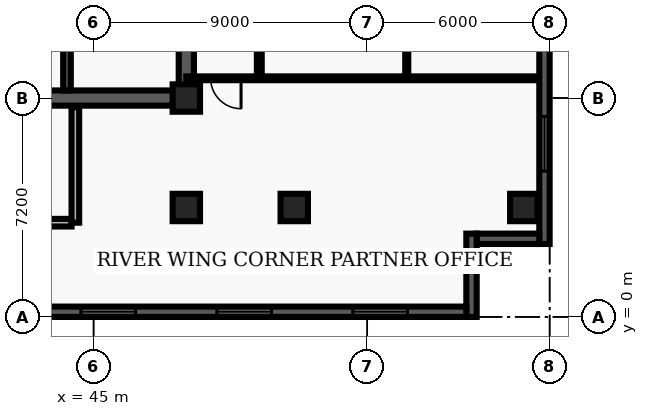
"""IFC4 building model, lengths in metres.
Left out: names, types, materials, properties, quantities, classifications, styles, units other than length and angle.
Written with IfcOpenShell. Run it as: python <this file> out.ifc"""

import sys

from ifc_helpers import new_model, entity, si_unit, converted_unit, direction, frame, origin_with_axes, origin_2d_with_axis, place, context, subcontext, project, spatial, polyline, rectangle, outline, extrude, element, fill, save


model = new_model("IFC4")
c1 = context("Model", 3, precision=1e-05, world=origin_with_axes(), true_north=direction((0.0, 1.0)))
c2 = subcontext(c1, "Body", "Model", "MODEL_VIEW")
j1 = project(units=[si_unit("LENGTHUNIT", "METRE"), converted_unit("PLANEANGLEUNIT", "DEGREE", entity("IfcPlaneAngleMeasure", 0.017), si_unit("PLANEANGLEUNIT", "RADIAN"), dimensions=[0, 0, 0, 0, 0, 0, 0])], contexts=[c1])
p1 = place(None, origin_with_axes())
s1 = spatial("IfcSite", under=j1, at=p1, CompositionType="ELEMENT")
p2 = place(p1, origin_with_axes())
s2 = spatial("IfcBuilding", under=s1, at=p2, CompositionType="ELEMENT")
p3 = place(p2, frame((0.0, 0.0, 200.4), z_axis=(0.0, 0.0, 1.0), x_axis=(1.0, 0.0, 0.0)))
s3 = spatial("IfcBuildingStorey", under=s2, at=p3, CompositionType="ELEMENT", Elevation=200.4)
p4 = place(p3, frame((40.2, 7.2, 0.0), z_axis=(0.0, 0.0, 1.0), x_axis=(1.0, 0.0, 0.0)))
e1 = element("IfcWall", 1, at=p4, inside=s3, PredefinedType="SHEAR", context=c2, shape_type="SweptSolid", body=[
    extrude(outline(polyline([(0.0, -0.25), (7.85, -0.25), (7.85, 0.25), (0.0, 0.25), (0.0, -0.25)])), origin_with_axes(), (0.0, 0.0, 1.0), 3.66),
])
p5 = place(p4, frame((2.175, 0.0, 0.0), z_axis=(0.0, 0.0, 1.0), x_axis=(1.0, 0.0, 0.0)))
e2 = element("IfcOpeningElement", 2, at=p5, cuts=e1, PredefinedType="OPENING", context=c2, shape_type="SweptSolid", body=[
    extrude(rectangle(XDim=1.05, YDim=0.52, at=origin_2d_with_axis()), origin_with_axes(), (0.0, 0.0, 1.0), 2.15),
])
p6 = place(p3, frame((48.05, 7.2, 0.0), z_axis=(0.0, 0.0, 1.0), x_axis=(0.0, 1.0, 0.0)))
e3 = element("IfcWall", 3, at=p6, inside=s3, PredefinedType="SHEAR", context=c2, shape_type="SweptSolid", body=[
    extrude(outline(polyline([(0.0, -0.25), (15.6, -0.25), (15.6, 0.25), (0.0, 0.25), (0.0, -0.25)])), origin_with_axes(), (0.0, 0.0, 1.0), 3.66),
])
p7 = place(p6, frame((5.975, 0.0, 0.0), z_axis=(0.0, 0.0, 1.0), x_axis=(1.0, 0.0, 0.0)))
e4 = element("IfcOpeningElement", 4, at=p7, cuts=e3, PredefinedType="OPENING", context=c2, shape_type="SweptSolid", body=[
    extrude(rectangle(XDim=1.05, YDim=0.52, at=origin_2d_with_axis()), origin_with_axes(), (0.0, 0.0, 1.0), 2.15),
])
p8 = place(p6, frame((2.725, 0.0, 0.0), z_axis=(0.0, 0.0, 1.0), x_axis=(1.0, 0.0, 0.0)))
e5 = element("IfcOpeningElement", 5, at=p8, cuts=e3, PredefinedType="OPENING", context=c2, shape_type="SweptSolid", body=[
    extrude(rectangle(XDim=0.95, YDim=0.52, at=origin_2d_with_axis()), origin_with_axes(), (0.0, 0.0, 1.0), 2.15),
])
p9 = place(p3, frame((44.125, 7.45, 0.0), z_axis=(0.0, 0.0, 1.0), x_axis=(0.0, 1.0, 0.0)))
e6 = element("IfcWall", 6, at=p9, inside=s3, PredefinedType="SHEAR", context=c2, shape_type="SweptSolid", body=[
    extrude(outline(polyline([(0.0, -0.125), (15.1, -0.125), (15.1, 0.125), (0.0, 0.125), (0.0, -0.125)])), origin_with_axes(), (0.0, 0.0, 1.0), 3.66),
])
p10 = place(p3, frame((40.325, 3.1, 0.0), z_axis=(0.0, 0.0, 1.0), x_axis=(1.0, 0.0, 0.0)))
e7 = element("IfcWall", 7, at=p10, inside=s3, PredefinedType="SOLIDWALL", context=c2, shape_type="SweptSolid", body=[
    extrude(outline(polyline([(0.0, -0.125), (3.95, -0.125), (3.95, 0.125), (0.0, 0.125), (0.0, -0.125)])), origin_with_axes(), (0.0, 0.0, 1.0), 2.7),
])
p11 = place(p3, frame((44.4, 3.1, 0.0), z_axis=(0.0, 0.0, 1.0), x_axis=(0.0, 1.0, 0.0)))
e8 = element("IfcWall", 8, at=p11, inside=s3, PredefinedType="SOLIDWALL", context=c2, shape_type="SweptSolid", body=[
    extrude(outline(polyline([(0.0, -0.125), (3.8, -0.125), (3.8, 0.125), (0.0, 0.125), (0.0, -0.125)])), origin_with_axes(), (0.0, 0.0, 1.0), 2.7),
])
for number, where, z_axis, x_axis in (
    (9, (48.05, 3.6, 0.0), (0.0, 0.0, 1.0), (1.0, 0.0, 0.0)),
    (10, (48.05, 7.2, 0.0), (0.0, 0.0, 1.0), (1.0, 0.0, 0.0)),
    (11, (51.6, 3.6, 0.0), (0.0, 0.0, 1.0), (1.0, 0.0, 0.0)),
    (12, (59.15, 3.6, 0.0), (0.0, 0.0, 1.0), (1.0, 0.0, 0.0)),
):
    element("IfcColumn", number, at=place(p3, frame(where, z_axis=z_axis, x_axis=x_axis)), inside=s3, PredefinedType="COLUMN", context=c2, shape_type="SweptSolid", body=[
        extrude(rectangle(XDim=0.9, YDim=0.9, at=origin_2d_with_axis()), origin_with_axes(), (0.0, 0.0, 1.0), 3.9),
    ])
p12 = place(p3, frame((50.45, 7.85, 0.0), z_axis=(0.0, 0.0, 1.0), x_axis=(0.0, 1.0, 0.0)))
e13 = element("IfcWall", 13, at=p12, inside=s3, PredefinedType="PARTITIONING", context=c2, shape_type="SweptSolid", body=[
    extrude(outline(polyline([(0.0, -0.08), (18.8, -0.08), (18.8, 0.08), (0.0, 0.08), (0.0, -0.08)])), origin_with_axes(), (0.0, 0.0, 1.0), 2.7),
])
p13 = place(p12, frame((4.113, 0.0, 0.0), z_axis=(0.0, 0.0, 1.0), x_axis=(1.0, 0.0, 0.0)))
e14 = element("IfcOpeningElement", 14, at=p13, cuts=e13, PredefinedType="OPENING", context=c2, shape_type="SweptSolid", body=[
    extrude(rectangle(XDim=1.0, YDim=0.18, at=origin_2d_with_axis()), origin_with_axes(), (0.0, 0.0, 1.0), 2.15),
])
p14 = place(p12, frame((7.883, 0.0, 0.0), z_axis=(0.0, 0.0, 1.0), x_axis=(1.0, 0.0, 0.0)))
e15 = element("IfcOpeningElement", 15, at=p14, cuts=e13, PredefinedType="OPENING", context=c2, shape_type="SweptSolid", body=[
    extrude(rectangle(XDim=1.0, YDim=0.18, at=origin_2d_with_axis()), origin_with_axes(), (0.0, 0.0, 1.0), 2.15),
])
p15 = place(p12, frame((11.928, 0.0, 0.0), z_axis=(0.0, 0.0, 1.0), x_axis=(1.0, 0.0, 0.0)))
e16 = element("IfcOpeningElement", 16, at=p15, cuts=e13, PredefinedType="OPENING", context=c2, shape_type="SweptSolid", body=[
    extrude(rectangle(XDim=1.0, YDim=0.18, at=origin_2d_with_axis()), origin_with_axes(), (0.0, 0.0, 1.0), 2.15),
])
p16 = place(p12, frame((17.587, 0.0, 0.0), z_axis=(0.0, 0.0, 1.0), x_axis=(1.0, 0.0, 0.0)))
e17 = element("IfcOpeningElement", 17, at=p16, cuts=e13, PredefinedType="OPENING", context=c2, shape_type="SweptSolid", body=[
    extrude(rectangle(XDim=1.0, YDim=0.18, at=origin_2d_with_axis()), origin_with_axes(), (0.0, 0.0, 1.0), 2.15),
])
p17 = place(p3, frame((59.665, 7.85, 0.0), z_axis=(0.0, 0.0, 1.0), x_axis=(-1.0, 0.0, 0.0)))
e18 = element("IfcWall", 18, at=p17, inside=s3, PredefinedType="PARTITIONING", context=c2, shape_type="SweptSolid", body=[
    extrude(outline(polyline([(0.0, -0.062), (11.615, -0.062), (11.615, 0.062), (0.0, 0.062), (0.0, -0.062)])), origin_with_axes(), (0.0, 0.0, 1.0), 2.7),
])
p18 = place(p17, frame((10.315, 0.0, 0.0), z_axis=(0.0, 0.0, 1.0), x_axis=(1.0, 0.0, 0.0)))
e19 = element("IfcOpeningElement", 19, at=p18, cuts=e18, PredefinedType="OPENING", context=c2, shape_type="SweptSolid", body=[
    extrude(rectangle(XDim=1.0, YDim=0.145, at=origin_2d_with_axis()), origin_with_axes(), (0.0, 0.0, 1.0), 2.15),
])
p19 = place(p3, frame((55.3, 7.98, 0.0), z_axis=(0.0, 0.0, 1.0), x_axis=(0.0, 1.0, 0.0)))
e20 = element("IfcWall", 20, at=p19, inside=s3, PredefinedType="PARTITIONING", context=c2, shape_type="SweptSolid", body=[
    extrude(outline(polyline([(0.0, -0.05), (18.54, -0.05), (18.54, 0.05), (0.0, 0.05), (0.0, -0.05)])), origin_with_axes(), (0.0, 0.0, 1.0), 2.7),
])
p20 = place(p19, frame((3.103, 0.0, 0.0), z_axis=(0.0, 0.0, 1.0), x_axis=(1.0, 0.0, 0.0)))
e21 = element("IfcOpeningElement", 21, at=p20, cuts=e20, PredefinedType="OPENING", context=c2, shape_type="SweptSolid", body=[
    extrude(rectangle(XDim=0.95, YDim=0.12, at=origin_2d_with_axis()), origin_with_axes(), (0.0, 0.0, 1.0), 2.15),
])
p21 = place(p19, frame((8.033, 0.0, 0.0), z_axis=(0.0, 0.0, 1.0), x_axis=(1.0, 0.0, 0.0)))
e22 = element("IfcOpeningElement", 22, at=p21, cuts=e20, PredefinedType="OPENING", context=c2, shape_type="SweptSolid", body=[
    extrude(rectangle(XDim=0.95, YDim=0.12, at=origin_2d_with_axis()), origin_with_axes(), (0.0, 0.0, 1.0), 2.15),
])
p22 = place(p19, frame((11.797, 0.0, 0.0), z_axis=(0.0, 0.0, 1.0), x_axis=(1.0, 0.0, 0.0)))
e23 = element("IfcOpeningElement", 23, at=p22, cuts=e20, PredefinedType="OPENING", context=c2, shape_type="SweptSolid", body=[
    extrude(rectangle(XDim=0.95, YDim=0.12, at=origin_2d_with_axis()), origin_with_axes(), (0.0, 0.0, 1.0), 2.15),
])
p23 = place(p19, frame((16.207, 0.0, 0.0), z_axis=(0.0, 0.0, 1.0), x_axis=(1.0, 0.0, 0.0)))
e24 = element("IfcOpeningElement", 24, at=p23, cuts=e20, PredefinedType="OPENING", context=c2, shape_type="SweptSolid", body=[
    extrude(rectangle(XDim=0.95, YDim=0.12, at=origin_2d_with_axis()), origin_with_axes(), (0.0, 0.0, 1.0), 2.15),
])
p24 = place(p3, frame((59.83, 26.06, 0.0), z_axis=(0.0, 0.0, 1.0), x_axis=(0.0, -1.0, 0.0)))
e25 = element("IfcWall", 25, at=p24, inside=s3, PredefinedType="SOLIDWALL", context=c2, shape_type="SweptSolid", body=[
    extrude(outline(polyline([(0.0, -0.17), (23.66, -0.17), (23.66, 0.17), (0.0, 0.17), (0.0, -0.17)])), origin_with_axes(), (0.0, 0.0, 1.0), 3.66),
])
p25 = place(p24, frame((20.364, 0.0, 0.45), z_axis=(0.0, 0.0, 1.0), x_axis=(1.0, 0.0, 0.0)))
e26 = element("IfcOpeningElement", 26, at=p25, cuts=e25, PredefinedType="OPENING", context=c2, shape_type="SweptSolid", body=[
    extrude(rectangle(XDim=1.8, YDim=0.36, at=origin_2d_with_axis()), origin_with_axes(), (0.0, 0.0, 1.0), 2.1),
])
p26 = place(p3, frame((59.66, 2.57, 0.0), z_axis=(0.0, 0.0, 1.0), x_axis=(-1.0, 0.0, 0.0)))
e27 = element("IfcWall", 27, at=p26, inside=s3, PredefinedType="SOLIDWALL", context=c2, shape_type="SweptSolid", body=[
    extrude(outline(polyline([(0.0, -0.17), (2.06, -0.17), (2.06, 0.17), (0.0, 0.17), (0.0, -0.17)])), origin_with_axes(), (0.0, 0.0, 1.0), 3.66),
])
p27 = place(p3, frame((57.43, 2.74, 0.0), z_axis=(0.0, 0.0, 1.0), x_axis=(0.0, -1.0, 0.0)))
e28 = element("IfcWall", 28, at=p27, inside=s3, PredefinedType="SOLIDWALL", context=c2, shape_type="SweptSolid", body=[
    extrude(outline(polyline([(0.0, -0.17), (2.74, -0.17), (2.74, 0.17), (0.0, 0.17), (0.0, -0.17)])), origin_with_axes(), (0.0, 0.0, 1.0), 3.66),
])
p28 = place(p3, frame((57.26, 0.17, 0.0), z_axis=(0.0, 0.0, 1.0), x_axis=(-1.0, 0.0, 0.0)))
e29 = element("IfcWall", 29, at=p28, inside=s3, PredefinedType="SOLIDWALL", context=c2, shape_type="SweptSolid", body=[
    extrude(outline(polyline([(0.0, -0.17), (54.86, -0.17), (54.86, 0.17), (0.0, 0.17), (0.0, -0.17)])), origin_with_axes(), (0.0, 0.0, 1.0), 3.66),
])
p29 = place(p28, frame((2.836, 0.0, 0.45), z_axis=(0.0, 0.0, 1.0), x_axis=(1.0, 0.0, 0.0)))
e30 = element("IfcOpeningElement", 30, at=p29, cuts=e29, PredefinedType="OPENING", context=c2, shape_type="SweptSolid", body=[
    extrude(rectangle(XDim=1.8, YDim=0.36, at=origin_2d_with_axis()), origin_with_axes(), (0.0, 0.0, 1.0), 2.1),
])
p30 = place(p28, frame((7.307, 0.0, 0.45), z_axis=(0.0, 0.0, 1.0), x_axis=(1.0, 0.0, 0.0)))
e31 = element("IfcOpeningElement", 31, at=p30, cuts=e29, PredefinedType="OPENING", context=c2, shape_type="SweptSolid", body=[
    extrude(rectangle(XDim=1.8, YDim=0.36, at=origin_2d_with_axis()), origin_with_axes(), (0.0, 0.0, 1.0), 2.1),
])
p31 = place(p28, frame((11.779, 0.0, 0.45), z_axis=(0.0, 0.0, 1.0), x_axis=(1.0, 0.0, 0.0)))
e32 = element("IfcOpeningElement", 32, at=p31, cuts=e29, PredefinedType="OPENING", context=c2, shape_type="SweptSolid", body=[
    extrude(rectangle(XDim=1.8, YDim=0.36, at=origin_2d_with_axis()), origin_with_axes(), (0.0, 0.0, 1.0), 2.1),
])
p32 = place(p28, frame((16.251, 0.0, 0.45), z_axis=(0.0, 0.0, 1.0), x_axis=(1.0, 0.0, 0.0)))
e33 = element("IfcOpeningElement", 33, at=p32, cuts=e29, PredefinedType="OPENING", context=c2, shape_type="SweptSolid", body=[
    extrude(rectangle(XDim=1.8, YDim=0.36, at=origin_2d_with_axis()), origin_with_axes(), (0.0, 0.0, 1.0), 2.1),
])
p33 = place(p28, frame((20.723, 0.0, 0.45), z_axis=(0.0, 0.0, 1.0), x_axis=(1.0, 0.0, 0.0)))
e34 = element("IfcOpeningElement", 34, at=p33, cuts=e29, PredefinedType="OPENING", context=c2, shape_type="SweptSolid", body=[
    extrude(rectangle(XDim=1.8, YDim=0.36, at=origin_2d_with_axis()), origin_with_axes(), (0.0, 0.0, 1.0), 2.1),
])
p34 = place(p28, frame((34.588, 0.0, 0.45), z_axis=(0.0, 0.0, 1.0), x_axis=(1.0, 0.0, 0.0)))
e35 = element("IfcOpeningElement", 35, at=p34, cuts=e29, PredefinedType="OPENING", context=c2, shape_type="SweptSolid", body=[
    extrude(rectangle(XDim=1.8, YDim=0.36, at=origin_2d_with_axis()), origin_with_axes(), (0.0, 0.0, 1.0), 2.1),
])
p35 = place(p28, frame((38.609, 0.0, 0.45), z_axis=(0.0, 0.0, 1.0), x_axis=(1.0, 0.0, 0.0)))
e36 = element("IfcOpeningElement", 36, at=p35, cuts=e29, PredefinedType="OPENING", context=c2, shape_type="SweptSolid", body=[
    extrude(rectangle(XDim=1.8, YDim=0.36, at=origin_2d_with_axis()), origin_with_axes(), (0.0, 0.0, 1.0), 2.1),
])
p36 = place(p28, frame((43.081, 0.0, 0.45), z_axis=(0.0, 0.0, 1.0), x_axis=(1.0, 0.0, 0.0)))
e37 = element("IfcOpeningElement", 37, at=p36, cuts=e29, PredefinedType="OPENING", context=c2, shape_type="SweptSolid", body=[
    extrude(rectangle(XDim=1.8, YDim=0.36, at=origin_2d_with_axis()), origin_with_axes(), (0.0, 0.0, 1.0), 2.1),
])
p37 = place(p28, frame((48.003, 0.0, 0.45), z_axis=(0.0, 0.0, 1.0), x_axis=(1.0, 0.0, 0.0)))
e38 = element("IfcOpeningElement", 38, at=p37, cuts=e29, PredefinedType="OPENING", context=c2, shape_type="SweptSolid", body=[
    extrude(rectangle(XDim=1.8, YDim=0.36, at=origin_2d_with_axis()), origin_with_axes(), (0.0, 0.0, 1.0), 2.1),
])
p38 = place(p28, frame((52.024, 0.0, 0.45), z_axis=(0.0, 0.0, 1.0), x_axis=(1.0, 0.0, 0.0)))
e39 = element("IfcOpeningElement", 39, at=p38, cuts=e29, PredefinedType="OPENING", context=c2, shape_type="SweptSolid", body=[
    extrude(rectangle(XDim=1.8, YDim=0.36, at=origin_2d_with_axis()), origin_with_axes(), (0.0, 0.0, 1.0), 2.1),
])
p39 = place(p17, frame((10.315, 0.0, 0.0), z_axis=(0.0, 0.0, 1.0), x_axis=(1.0, 0.0, 0.0)))
e40 = element("IfcDoor", 40, at=p39, inside=s3, OperationType="SINGLE_SWING_LEFT", PredefinedType="DOOR", context=c2, shape_type="SweptSolid", body=[
    extrude(rectangle(XDim=1.0, YDim=0.075, at=origin_2d_with_axis()), origin_with_axes(), (0.0, 0.0, 1.0), 2.15),
])
fill(e19, e40)
p40 = place(p24, frame((20.364, 0.0, 0.45), z_axis=(0.0, 0.0, 1.0), x_axis=(1.0, 0.0, 0.0)))
e41 = element("IfcWindow", 41, at=p40, inside=s3, PredefinedType="WINDOW", context=c2, shape_type="SweptSolid", body=[
    extrude(rectangle(XDim=1.8, YDim=0.09, at=origin_2d_with_axis()), origin_with_axes(), (0.0, 0.0, 1.0), 2.1),
])
fill(e26, e41)
p41 = place(p28, frame((2.836, 0.0, 0.45), z_axis=(0.0, 0.0, 1.0), x_axis=(1.0, 0.0, 0.0)))
e42 = element("IfcWindow", 42, at=p41, inside=s3, PredefinedType="WINDOW", context=c2, shape_type="SweptSolid", body=[
    extrude(rectangle(XDim=1.8, YDim=0.09, at=origin_2d_with_axis()), origin_with_axes(), (0.0, 0.0, 1.0), 2.1),
])
fill(e30, e42)
p42 = place(p28, frame((7.307, 0.0, 0.45), z_axis=(0.0, 0.0, 1.0), x_axis=(1.0, 0.0, 0.0)))
e43 = element("IfcWindow", 43, at=p42, inside=s3, PredefinedType="WINDOW", context=c2, shape_type="SweptSolid", body=[
    extrude(rectangle(XDim=1.8, YDim=0.09, at=origin_2d_with_axis()), origin_with_axes(), (0.0, 0.0, 1.0), 2.1),
])
fill(e31, e43)
p43 = place(p28, frame((11.779, 0.0, 0.45), z_axis=(0.0, 0.0, 1.0), x_axis=(1.0, 0.0, 0.0)))
e44 = element("IfcWindow", 44, at=p43, inside=s3, PredefinedType="WINDOW", context=c2, shape_type="SweptSolid", body=[
    extrude(rectangle(XDim=1.8, YDim=0.09, at=origin_2d_with_axis()), origin_with_axes(), (0.0, 0.0, 1.0), 2.1),
])
fill(e32, e44)
save(model, sys.argv[1])
